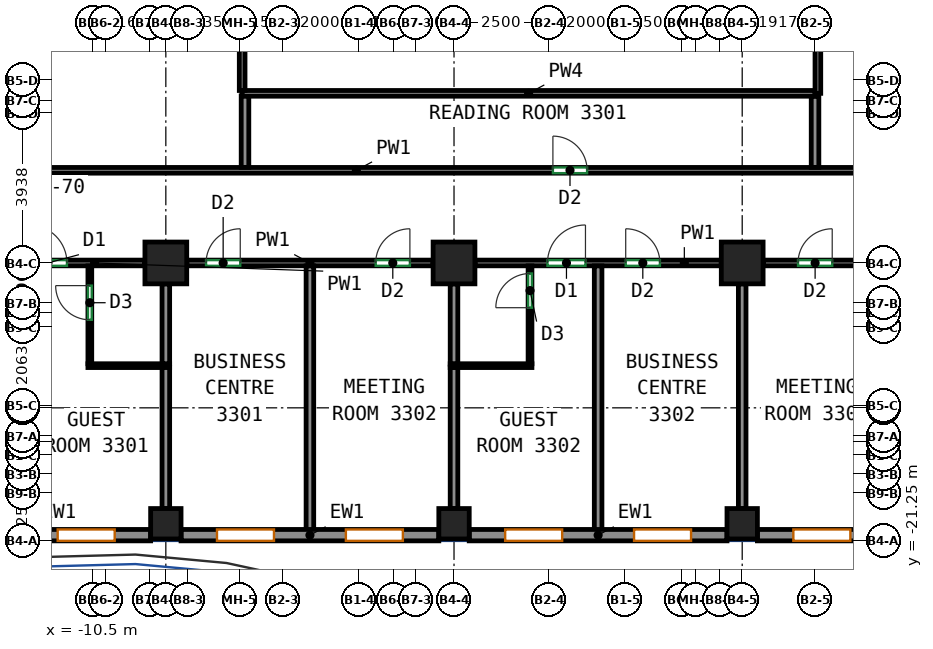
"""IFC4 building model, lengths in metres.
Left out: names, types, materials, properties, quantities, classifications, styles, units other than length and angle.
Written with IfcOpenShell. Run it as: python <this file> out.ifc"""

import sys

from ifc_helpers import new_model, si_unit, direction, frame, frame_2d, origin, origin_2d, place, context, subcontext, project, spatial, rectangle, extrude, source, transform, mapped, element, fill, save


model = new_model("IFC4")
c1 = context("Model", 3, precision=1e-05, world=origin(), true_north=direction((0.0, 1.0)))
c2 = subcontext(c1, "Body", "Model", "MODEL_VIEW")
j1 = project(units=[si_unit("LENGTHUNIT", "METRE"), si_unit("PLANEANGLEUNIT", "RADIAN")], contexts=[c1])
p1 = place(None, origin())
s1 = spatial("IfcSite", under=j1, at=p1, CompositionType="ELEMENT")
p2 = place(p1, origin())
s2 = spatial("IfcBuilding", under=s1, at=p2, CompositionType="ELEMENT")
p3 = place(p2, frame((0.0, 0.0, 147.3)))
s3 = spatial("IfcBuildingStorey", under=s2, at=p3, CompositionType="ELEMENT", Elevation=147.3)
m1 = source(origin(), c2, "Body", "SweptSolid", [
    extrude(rectangle(XDim=0.8, YDim=0.8, at=origin_2d()), origin(), (0.0, 0.0, 1.0), 3.12),
])
p4 = place(p3, frame((-8.583, -20.8, 0.0), z_axis=(0.0, 0.0, 1.0), x_axis=(1.0, 0.0, 0.0)))
e1 = element("IfcColumn", 1, at=p4, inside=s3, PredefinedType="COLUMN", context=c2, shape_type="MappedRepresentation", body=[
    mapped(m1, transform((0.0, 0.0, 0.0))),
])
m2 = source(origin(), c2, "Body", "SweptSolid", [
    extrude(rectangle(XDim=1.1, YDim=1.1, at=origin_2d()), origin(), (0.0, 0.0, 1.0), 3.12),
])
p5 = place(p3, frame((-8.583, -13.938, 0.0), z_axis=(0.0, 0.0, 1.0), x_axis=(1.0, 0.0, 0.0)))
e2 = element("IfcColumn", 2, at=p5, inside=s3, PredefinedType="COLUMN", context=c2, shape_type="MappedRepresentation", body=[
    mapped(m2, transform((0.0, 0.0, 0.0))),
])
p6 = place(p3, frame((-1.0, -20.8, 0.0), z_axis=(0.0, 0.0, 1.0), x_axis=(1.0, 0.0, 0.0)))
e3 = element("IfcColumn", 3, at=p6, inside=s3, PredefinedType="COLUMN", context=c2, shape_type="MappedRepresentation", body=[
    mapped(m1, transform((0.0, 0.0, 0.0))),
])
p7 = place(p3, frame((-1.0, -13.938, 0.0), z_axis=(0.0, 0.0, 1.0), x_axis=(1.0, 0.0, 0.0)))
e4 = element("IfcColumn", 4, at=p7, inside=s3, PredefinedType="COLUMN", context=c2, shape_type="MappedRepresentation", body=[
    mapped(m2, transform((0.0, 0.0, 0.0))),
])
p8 = place(p3, frame((6.583, -20.8, 0.0), z_axis=(0.0, 0.0, 1.0), x_axis=(1.0, 0.0, 0.0)))
e5 = element("IfcColumn", 5, at=p8, inside=s3, PredefinedType="COLUMN", context=c2, shape_type="MappedRepresentation", body=[
    mapped(m1, transform((0.0, 0.0, 0.0))),
])
p9 = place(p3, frame((6.583, -13.938, 0.0), z_axis=(0.0, 0.0, 1.0), x_axis=(1.0, 0.0, 0.0)))
e6 = element("IfcColumn", 6, at=p9, inside=s3, PredefinedType="COLUMN", context=c2, shape_type="MappedRepresentation", body=[
    mapped(m2, transform((0.0, 0.0, 0.0))),
])
m3 = source(origin(), c2, "Body", "SweptSolid", [
    extrude(rectangle(XDim=6.783, YDim=0.3, at=frame_2d((3.392, 0.0))), origin(), (0.0, 0.0, 1.0), 3.12),
])
p10 = place(p3, frame((-15.767, -21.1, 0.0), z_axis=(0.0, 0.0, 1.0), x_axis=(1.0, 0.0, 0.0)))
e7 = element("IfcWall", 7, at=p10, inside=s3, PredefinedType="SOLIDWALL", context=c2, shape_type="MappedRepresentation", body=[
    mapped(m3, transform((0.0, 0.0, 0.0))),
])
p11 = place(p10, frame((0.946, 0.0, 0.85)))
e8 = element("IfcOpeningElement", 8, at=p11, cuts=e7, PredefinedType="OPENING", context=c2, shape_type="SweptSolid", body=[
    extrude(rectangle(XDim=1.5, YDim=1.95, at=frame_2d((0.75, 0.975))), frame((0.0, 0.16, 0.0), z_axis=(0.0, -1.0, 0.0), x_axis=(1.0, 0.0, 0.0)), (0.0, 0.0, 1.0), 0.32),
])
p12 = place(p10, frame((4.338, 0.0, 0.85)))
e9 = element("IfcOpeningElement", 9, at=p12, cuts=e7, PredefinedType="OPENING", context=c2, shape_type="SweptSolid", body=[
    extrude(rectangle(XDim=1.5, YDim=1.95, at=frame_2d((0.75, 0.975))), frame((0.0, 0.16, 0.0), z_axis=(0.0, -1.0, 0.0), x_axis=(1.0, 0.0, 0.0)), (0.0, 0.0, 1.0), 0.32),
])
m4 = source(origin(), c2, "Body", "SweptSolid", [
    extrude(rectangle(XDim=6.783, YDim=0.3, at=frame_2d((3.392, 0.0))), origin(), (0.0, 0.0, 1.0), 3.12),
])
p13 = place(p3, frame((-8.183, -21.1, 0.0), z_axis=(0.0, 0.0, 1.0), x_axis=(1.0, 0.0, 0.0)))
e10 = element("IfcWall", 10, at=p13, inside=s3, PredefinedType="SOLIDWALL", context=c2, shape_type="MappedRepresentation", body=[
    mapped(m4, transform((0.0, 0.0, 0.0))),
])
p14 = place(p13, frame((0.946, 0.0, 0.85)))
e11 = element("IfcOpeningElement", 11, at=p14, cuts=e10, PredefinedType="OPENING", context=c2, shape_type="SweptSolid", body=[
    extrude(rectangle(XDim=1.5, YDim=1.95, at=frame_2d((0.75, 0.975))), frame((0.0, 0.16, 0.0), z_axis=(0.0, -1.0, 0.0), x_axis=(1.0, 0.0, 0.0)), (0.0, 0.0, 1.0), 0.32),
])
p15 = place(p13, frame((4.337, 0.0, 0.85)))
e12 = element("IfcOpeningElement", 12, at=p15, cuts=e10, PredefinedType="OPENING", context=c2, shape_type="SweptSolid", body=[
    extrude(rectangle(XDim=1.5, YDim=1.95, at=frame_2d((0.75, 0.975))), frame((0.0, 0.16, 0.0), z_axis=(0.0, -1.0, 0.0), x_axis=(1.0, 0.0, 0.0)), (0.0, 0.0, 1.0), 0.32),
])
p16 = place(p3, frame((-0.6, -21.1, 0.0), z_axis=(0.0, 0.0, 1.0), x_axis=(1.0, 0.0, 0.0)))
e13 = element("IfcWall", 13, at=p16, inside=s3, PredefinedType="SOLIDWALL", context=c2, shape_type="MappedRepresentation", body=[
    mapped(m4, transform((0.0, 0.0, 0.0))),
])
p17 = place(p16, frame((0.946, 0.0, 0.85)))
e14 = element("IfcOpeningElement", 14, at=p17, cuts=e13, PredefinedType="OPENING", context=c2, shape_type="SweptSolid", body=[
    extrude(rectangle(XDim=1.5, YDim=1.95, at=frame_2d((0.75, 0.975))), frame((0.0, 0.16, 0.0), z_axis=(0.0, -1.0, 0.0), x_axis=(1.0, 0.0, 0.0)), (0.0, 0.0, 1.0), 0.32),
])
p18 = place(p16, frame((4.337, 0.0, 0.85)))
e15 = element("IfcOpeningElement", 15, at=p18, cuts=e13, PredefinedType="OPENING", context=c2, shape_type="SweptSolid", body=[
    extrude(rectangle(XDim=1.5, YDim=1.95, at=frame_2d((0.75, 0.975))), frame((0.0, 0.16, 0.0), z_axis=(0.0, -1.0, 0.0), x_axis=(1.0, 0.0, 0.0)), (0.0, 0.0, 1.0), 0.32),
])
p19 = place(p3, frame((6.983, -21.1, 0.0), z_axis=(0.0, 0.0, 1.0), x_axis=(1.0, 0.0, 0.0)))
e16 = element("IfcWall", 16, at=p19, inside=s3, PredefinedType="SOLIDWALL", context=c2, shape_type="MappedRepresentation", body=[
    mapped(m3, transform((0.0, 0.0, 0.0))),
])
p20 = place(p19, frame((0.946, 0.0, 0.85)))
e17 = element("IfcOpeningElement", 17, at=p20, cuts=e16, PredefinedType="OPENING", context=c2, shape_type="SweptSolid", body=[
    extrude(rectangle(XDim=1.5, YDim=1.95, at=frame_2d((0.75, 0.975))), frame((0.0, 0.16, 0.0), z_axis=(0.0, -1.0, 0.0), x_axis=(1.0, 0.0, 0.0)), (0.0, 0.0, 1.0), 0.32),
])
p21 = place(p19, frame((4.338, 0.0, 0.85)))
e18 = element("IfcOpeningElement", 18, at=p21, cuts=e16, PredefinedType="OPENING", context=c2, shape_type="SweptSolid", body=[
    extrude(rectangle(XDim=1.5, YDim=1.95, at=frame_2d((0.75, 0.975))), frame((0.0, 0.16, 0.0), z_axis=(0.0, -1.0, 0.0), x_axis=(1.0, 0.0, 0.0)), (0.0, 0.0, 1.0), 0.32),
])
p22 = place(p3, frame((-13.55, -13.938, 0.0), z_axis=(0.0, 0.0, 1.0), x_axis=(1.0, 0.0, 0.0)))
e19 = element("IfcWall", 19, at=p22, inside=s3, PredefinedType="PARTITIONING", context=c2, shape_type="SweptSolid", body=[
    extrude(rectangle(XDim=4.417, YDim=0.15, at=frame_2d((2.208, 0.0))), origin(), (0.0, 0.0, 1.0), 3.12),
])
p23 = place(p22, frame((1.365, 0.0, 0.0)))
e20 = element("IfcOpeningElement", 20, at=p23, cuts=e19, PredefinedType="OPENING", context=c2, shape_type="SweptSolid", body=[
    extrude(rectangle(XDim=1.0, YDim=2.1, at=frame_2d((0.5, 1.05))), frame((0.0, 0.085, 0.0), z_axis=(0.0, -1.0, 0.0), x_axis=(1.0, 0.0, 0.0)), (0.0, 0.0, 1.0), 0.17),
])
p24 = place(p3, frame((-8.033, -13.938, 0.0), z_axis=(0.0, 0.0, 1.0), x_axis=(1.0, 0.0, 0.0)))
e21 = element("IfcWall", 21, at=p24, inside=s3, PredefinedType="PARTITIONING", context=c2, shape_type="SweptSolid", body=[
    extrude(rectangle(XDim=6.483, YDim=0.15, at=frame_2d((3.241, 0.0))), origin(), (0.0, 0.0, 1.0), 3.12),
])
p25 = place(p24, frame((0.508, 0.0, 0.0)))
e22 = element("IfcOpeningElement", 22, at=p25, cuts=e21, PredefinedType="OPENING", context=c2, shape_type="SweptSolid", body=[
    extrude(rectangle(XDim=0.9, YDim=2.1, at=frame_2d((0.45, 1.05))), frame((0.0, 0.085, 0.0), z_axis=(0.0, -1.0, 0.0), x_axis=(1.0, 0.0, 0.0)), (0.0, 0.0, 1.0), 0.17),
])
p26 = place(p24, frame((4.972, 0.0, 0.0)))
e23 = element("IfcOpeningElement", 23, at=p26, cuts=e21, PredefinedType="OPENING", context=c2, shape_type="SweptSolid", body=[
    extrude(rectangle(XDim=0.9, YDim=2.1, at=frame_2d((0.45, 1.05))), frame((0.0, 0.085, 0.0), z_axis=(0.0, -1.0, 0.0), x_axis=(1.0, 0.0, 0.0)), (0.0, 0.0, 1.0), 0.17),
])
p27 = place(p3, frame((-0.45, -13.938, 0.0), z_axis=(0.0, 0.0, 1.0), x_axis=(1.0, 0.0, 0.0)))
e24 = element("IfcWall", 24, at=p27, inside=s3, PredefinedType="PARTITIONING", context=c2, shape_type="SweptSolid", body=[
    extrude(rectangle(XDim=6.483, YDim=0.15, at=frame_2d((3.241, 0.0))), origin(), (0.0, 0.0, 1.0), 3.12),
])
p28 = place(p27, frame((1.909, 0.0, 0.0)))
e25 = element("IfcOpeningElement", 25, at=p28, cuts=e24, PredefinedType="OPENING", context=c2, shape_type="SweptSolid", body=[
    extrude(rectangle(XDim=1.0, YDim=2.1, at=frame_2d((0.5, 1.05))), frame((0.0, 0.085, 0.0), z_axis=(0.0, -1.0, 0.0), x_axis=(1.0, 0.0, 0.0)), (0.0, 0.0, 1.0), 0.17),
])
p29 = place(p27, frame((3.968, 0.0, 0.0)))
e26 = element("IfcOpeningElement", 26, at=p29, cuts=e24, PredefinedType="OPENING", context=c2, shape_type="SweptSolid", body=[
    extrude(rectangle(XDim=0.9, YDim=2.1, at=frame_2d((0.45, 1.05))), frame((0.0, 0.085, 0.0), z_axis=(0.0, -1.0, 0.0), x_axis=(1.0, 0.0, 0.0)), (0.0, 0.0, 1.0), 0.17),
])
p30 = place(p3, frame((7.133, -13.938, 0.0), z_axis=(0.0, 0.0, 1.0), x_axis=(1.0, 0.0, 0.0)))
e27 = element("IfcWall", 27, at=p30, inside=s3, PredefinedType="PARTITIONING", context=c2, shape_type="SweptSolid", body=[
    extrude(rectangle(XDim=6.484, YDim=0.15, at=frame_2d((3.242, 0.0))), origin(), (0.0, 0.0, 1.0), 3.12),
])
p31 = place(p30, frame((0.919, 0.0, 0.0)))
e28 = element("IfcOpeningElement", 28, at=p31, cuts=e27, PredefinedType="OPENING", context=c2, shape_type="SweptSolid", body=[
    extrude(rectangle(XDim=0.9, YDim=2.1, at=frame_2d((0.45, 1.05))), frame((0.0, 0.085, 0.0), z_axis=(0.0, -1.0, 0.0), x_axis=(1.0, 0.0, 0.0)), (0.0, 0.0, 1.0), 0.17),
])
p32 = place(p30, frame((3.432, 0.0, 0.0)))
e29 = element("IfcOpeningElement", 29, at=p32, cuts=e27, PredefinedType="OPENING", context=c2, shape_type="SweptSolid", body=[
    extrude(rectangle(XDim=1.0, YDim=2.1, at=frame_2d((0.5, 1.05))), frame((0.0, 0.085, 0.0), z_axis=(0.0, -1.0, 0.0), x_axis=(1.0, 0.0, 0.0)), (0.0, 0.0, 1.0), 0.17),
])
p33 = place(p3, frame((-12.075, -11.5, 0.0), z_axis=(0.0, 0.0, 1.0), x_axis=(1.0, 0.0, 0.0)))
e30 = element("IfcWall", 30, at=p33, inside=s3, PredefinedType="PARTITIONING", context=c2, shape_type="SweptSolid", body=[
    extrude(rectangle(XDim=28.35, YDim=0.15, at=frame_2d((14.175, 0.0))), origin(), (0.0, 0.0, 1.0), 3.12),
])
p34 = place(p33, frame((13.677, 0.0, 0.0)))
e31 = element("IfcOpeningElement", 31, at=p34, cuts=e30, PredefinedType="OPENING", context=c2, shape_type="SweptSolid", body=[
    extrude(rectangle(XDim=0.9, YDim=2.1, at=frame_2d((0.45, 1.05))), frame((0.0, 0.085, 0.0), z_axis=(0.0, -1.0, 0.0), x_axis=(1.0, 0.0, 0.0)), (0.0, 0.0, 1.0), 0.17),
])
p35 = place(p3, frame((-10.583, -16.59, 0.0), z_axis=(0.0, 0.0, 1.0), x_axis=(0.0, 1.0, 0.0)))
e32 = element("IfcWall", 32, at=p35, inside=s3, PredefinedType="PARTITIONING", context=c2, shape_type="SweptSolid", body=[
    extrude(rectangle(XDim=2.575, YDim=0.1, at=frame_2d((1.288, 0.0))), origin(), (0.0, 0.0, 1.0), 3.12),
])
p36 = place(p35, frame((1.156, 0.0, 0.0)))
e33 = element("IfcOpeningElement", 33, at=p36, cuts=e32, PredefinedType="OPENING", context=c2, shape_type="SweptSolid", body=[
    extrude(rectangle(XDim=0.9, YDim=2.1, at=frame_2d((0.45, 1.05))), frame((0.0, 0.06, 0.0), z_axis=(0.0, -1.0, 0.0), x_axis=(1.0, 0.0, 0.0)), (0.0, 0.0, 1.0), 0.12),
])
p37 = place(p3, frame((-10.633, -16.64, 0.0), z_axis=(0.0, 0.0, 1.0), x_axis=(1.0, 0.0, 0.0)))
e34 = element("IfcWall", 34, at=p37, inside=s3, PredefinedType="PARTITIONING", context=c2, shape_type="SweptSolid", body=[
    extrude(rectangle(XDim=2.15, YDim=0.1, at=frame_2d((1.075, 0.0))), origin(), (0.0, 0.0, 1.0), 3.12),
])
p38 = place(p3, frame((-8.583, -20.4, 0.0), z_axis=(0.0, 0.0, 1.0), x_axis=(0.0, 1.0, 0.0)))
e35 = element("IfcWall", 35, at=p38, inside=s3, PredefinedType="PARTITIONING", context=c2, shape_type="SweptSolid", body=[
    extrude(rectangle(XDim=3.71, YDim=0.2, at=frame_2d((1.855, 0.0))), origin(), (0.0, 0.0, 1.0), 3.12),
])
p39 = place(p3, frame((-8.583, -16.59, 0.0), z_axis=(0.0, 0.0, 1.0), x_axis=(0.0, 1.0, 0.0)))
e36 = element("IfcWall", 36, at=p39, inside=s3, PredefinedType="PARTITIONING", context=c2, shape_type="SweptSolid", body=[
    extrude(rectangle(XDim=2.102, YDim=0.2, at=frame_2d((1.051, 0.0))), origin(), (0.0, 0.0, 1.0), 3.12),
])
p40 = place(p3, frame((-4.792, -21.0, 0.0), z_axis=(0.0, 0.0, 1.0), x_axis=(0.0, 1.0, 0.0)))
e37 = element("IfcWall", 37, at=p40, inside=s3, PredefinedType="PARTITIONING", context=c2, shape_type="SweptSolid", body=[
    extrude(rectangle(XDim=6.985, YDim=0.2, at=frame_2d((3.493, 0.0))), origin(), (0.0, 0.0, 1.0), 3.12),
])
p41 = place(p3, frame((-1.0, -20.4, 0.0), z_axis=(0.0, 0.0, 1.0), x_axis=(0.0, 1.0, 0.0)))
e38 = element("IfcWall", 38, at=p41, inside=s3, PredefinedType="PARTITIONING", context=c2, shape_type="SweptSolid", body=[
    extrude(rectangle(XDim=3.72, YDim=0.2, at=frame_2d((1.86, 0.0))), origin(), (0.0, 0.0, 1.0), 3.12),
])
p42 = place(p3, frame((-1.0, -16.6, 0.0), z_axis=(0.0, 0.0, 1.0), x_axis=(0.0, 1.0, 0.0)))
e39 = element("IfcWall", 39, at=p42, inside=s3, PredefinedType="PARTITIONING", context=c2, shape_type="SweptSolid", body=[
    extrude(rectangle(XDim=2.112, YDim=0.2, at=frame_2d((1.056, 0.0))), origin(), (0.0, 0.0, 1.0), 3.12),
])
p43 = place(p3, frame((1.0, -16.59, 0.0), z_axis=(0.0, 0.0, 1.0), x_axis=(0.0, 1.0, 0.0)))
e40 = element("IfcWall", 40, at=p43, inside=s3, PredefinedType="PARTITIONING", context=c2, shape_type="SweptSolid", body=[
    extrude(rectangle(XDim=2.575, YDim=0.1, at=frame_2d((1.288, 0.0))), origin(), (0.0, 0.0, 1.0), 3.12),
])
p44 = place(p43, frame((1.475, 0.0, 0.0)))
e41 = element("IfcOpeningElement", 41, at=p44, cuts=e40, PredefinedType="OPENING", context=c2, shape_type="SweptSolid", body=[
    extrude(rectangle(XDim=0.9, YDim=2.1, at=frame_2d((0.45, 1.05))), frame((0.0, 0.06, 0.0), z_axis=(0.0, -1.0, 0.0), x_axis=(1.0, 0.0, 0.0)), (0.0, 0.0, 1.0), 0.12),
])
p45 = place(p3, frame((-1.1, -16.64, 0.0), z_axis=(0.0, 0.0, 1.0), x_axis=(1.0, 0.0, 0.0)))
e42 = element("IfcWall", 42, at=p45, inside=s3, PredefinedType="PARTITIONING", context=c2, shape_type="SweptSolid", body=[
    extrude(rectangle(XDim=2.15, YDim=0.1, at=frame_2d((1.075, 0.0))), origin(), (0.0, 0.0, 1.0), 3.12),
])
p46 = place(p3, frame((2.792, -21.0, 0.0), z_axis=(0.0, 0.0, 1.0), x_axis=(0.0, 1.0, 0.0)))
e43 = element("IfcWall", 43, at=p46, inside=s3, PredefinedType="PARTITIONING", context=c2, shape_type="SweptSolid", body=[
    extrude(rectangle(XDim=6.985, YDim=0.2, at=frame_2d((3.493, 0.0))), origin(), (0.0, 0.0, 1.0), 3.12),
])
p47 = place(p3, frame((6.583, -20.4, 0.0), z_axis=(0.0, 0.0, 1.0), x_axis=(0.0, 1.0, 0.0)))
e44 = element("IfcWall", 44, at=p47, inside=s3, PredefinedType="PARTITIONING", context=c2, shape_type="SweptSolid", body=[
    extrude(rectangle(XDim=5.912, YDim=0.2, at=frame_2d((2.956, 0.0))), origin(), (0.0, 0.0, 1.0), 3.12),
])
p48 = place(p3, frame((-6.5, -11.423, 0.0), z_axis=(0.0, 0.0, 1.0), x_axis=(0.0, 1.0, 0.0)))
e45 = element("IfcWall", 45, at=p48, inside=s3, PredefinedType="PARTITIONING", context=c2, shape_type="SweptSolid", body=[
    extrude(rectangle(XDim=1.883, YDim=0.2, at=frame_2d((0.941, 0.0))), origin(), (0.0, 0.0, 1.0), 3.12),
])
p49 = place(p3, frame((8.5, -11.423, 0.0), z_axis=(0.0, 0.0, 1.0), x_axis=(0.0, 1.0, 0.0)))
e46 = element("IfcWall", 46, at=p49, inside=s3, PredefinedType="PARTITIONING", context=c2, shape_type="SweptSolid", body=[
    extrude(rectangle(XDim=1.873, YDim=0.2, at=frame_2d((0.937, 0.0))), origin(), (0.0, 0.0, 1.0), 3.12),
])
p50 = place(p3, frame((8.5, -9.475, 0.0), z_axis=(0.0, 0.0, 1.0), x_axis=(-1.0, 0.0, 0.0)))
e47 = element("IfcWall", 47, at=p50, inside=s3, PredefinedType="PARTITIONING", context=c2, shape_type="SweptSolid", body=[
    extrude(rectangle(XDim=15.075, YDim=0.15, at=frame_2d((7.538, 0.0))), origin(), (0.0, 0.0, 1.0), 3.12),
])
p51 = place(p3, frame((-6.575, -9.4, 0.0), z_axis=(0.0, 0.0, 1.0), x_axis=(0.0, 1.0, 0.0)))
e48 = element("IfcWall", 48, at=p51, inside=s3, PredefinedType="PARTITIONING", context=c2, shape_type="SweptSolid", body=[
    extrude(rectangle(XDim=15.0, YDim=0.15, at=frame_2d((7.5, 0.0))), origin(), (0.0, 0.0, 1.0), 3.12),
])
p52 = place(p3, frame((8.575, 5.675, 0.0), z_axis=(0.0, 0.0, 1.0), x_axis=(0.0, -1.0, 0.0)))
e49 = element("IfcWall", 49, at=p52, inside=s3, PredefinedType="PARTITIONING", context=c2, shape_type="SweptSolid", body=[
    extrude(rectangle(XDim=15.15, YDim=0.15, at=frame_2d((7.575, 0.0))), origin(), (0.0, 0.0, 1.0), 3.12),
])
p53 = place(p12, origin())
e50 = element("IfcWindow", 50, at=p53, inside=s3, PartitioningType="SINGLE_PANEL", PredefinedType="WINDOW", context=c2, shape_type="SweptSolid", body=[
    extrude(rectangle(XDim=1.5, YDim=1.95, at=frame_2d((0.75, 0.975))), frame((0.0, 0.03, 0.0), z_axis=(0.0, -1.0, 0.0), x_axis=(1.0, 0.0, 0.0)), (0.0, 0.0, 1.0), 0.06),
])
fill(e9, e50)
p54 = place(p14, origin())
e51 = element("IfcWindow", 51, at=p54, inside=s3, PartitioningType="SINGLE_PANEL", PredefinedType="WINDOW", context=c2, shape_type="SweptSolid", body=[
    extrude(rectangle(XDim=1.5, YDim=1.95, at=frame_2d((0.75, 0.975))), frame((0.0, 0.03, 0.0), z_axis=(0.0, -1.0, 0.0), x_axis=(1.0, 0.0, 0.0)), (0.0, 0.0, 1.0), 0.06),
])
fill(e11, e51)
p55 = place(p15, origin())
e52 = element("IfcWindow", 52, at=p55, inside=s3, PartitioningType="SINGLE_PANEL", PredefinedType="WINDOW", context=c2, shape_type="SweptSolid", body=[
    extrude(rectangle(XDim=1.5, YDim=1.95, at=frame_2d((0.75, 0.975))), frame((0.0, 0.03, 0.0), z_axis=(0.0, -1.0, 0.0), x_axis=(1.0, 0.0, 0.0)), (0.0, 0.0, 1.0), 0.06),
])
fill(e12, e52)
p56 = place(p17, origin())
e53 = element("IfcWindow", 53, at=p56, inside=s3, PartitioningType="SINGLE_PANEL", PredefinedType="WINDOW", context=c2, shape_type="SweptSolid", body=[
    extrude(rectangle(XDim=1.5, YDim=1.95, at=frame_2d((0.75, 0.975))), frame((0.0, 0.03, 0.0), z_axis=(0.0, -1.0, 0.0), x_axis=(1.0, 0.0, 0.0)), (0.0, 0.0, 1.0), 0.06),
])
fill(e14, e53)
p57 = place(p18, origin())
e54 = element("IfcWindow", 54, at=p57, inside=s3, PartitioningType="SINGLE_PANEL", PredefinedType="WINDOW", context=c2, shape_type="SweptSolid", body=[
    extrude(rectangle(XDim=1.5, YDim=1.95, at=frame_2d((0.75, 0.975))), frame((0.0, 0.03, 0.0), z_axis=(0.0, -1.0, 0.0), x_axis=(1.0, 0.0, 0.0)), (0.0, 0.0, 1.0), 0.06),
])
fill(e15, e54)
p58 = place(p20, origin())
e55 = element("IfcWindow", 55, at=p58, inside=s3, PartitioningType="SINGLE_PANEL", PredefinedType="WINDOW", context=c2, shape_type="SweptSolid", body=[
    extrude(rectangle(XDim=1.5, YDim=1.95, at=frame_2d((0.75, 0.975))), frame((0.0, 0.03, 0.0), z_axis=(0.0, -1.0, 0.0), x_axis=(1.0, 0.0, 0.0)), (0.0, 0.0, 1.0), 0.06),
])
fill(e17, e55)
p59 = place(p36, origin())
e56 = element("IfcDoor", 56, at=p59, inside=s3, OperationType="SINGLE_SWING_RIGHT", PredefinedType="DOOR", context=c2, shape_type="SweptSolid", body=[
    extrude(rectangle(XDim=0.9, YDim=2.1, at=frame_2d((0.45, 1.05))), frame((0.0, 0.025, 0.0), z_axis=(0.0, -1.0, 0.0), x_axis=(1.0, 0.0, 0.0)), (0.0, 0.0, 1.0), 0.05),
])
fill(e33, e56)
p60 = place(p44, origin())
e57 = element("IfcDoor", 57, at=p60, inside=s3, OperationType="SINGLE_SWING_LEFT", PredefinedType="DOOR", context=c2, shape_type="SweptSolid", body=[
    extrude(rectangle(XDim=0.9, YDim=2.1, at=frame_2d((0.45, 1.05))), frame((0.0, 0.025, 0.0), z_axis=(0.0, -1.0, 0.0), x_axis=(1.0, 0.0, 0.0)), (0.0, 0.0, 1.0), 0.05),
])
fill(e41, e57)
p61 = place(p23, origin())
e58 = element("IfcDoor", 58, at=p61, inside=s3, OperationType="SINGLE_SWING_LEFT", PredefinedType="DOOR", context=c2, shape_type="SweptSolid", body=[
    extrude(rectangle(XDim=1.0, YDim=2.1, at=frame_2d((0.5, 1.05))), frame((0.0, 0.025, 0.0), z_axis=(0.0, -1.0, 0.0), x_axis=(1.0, 0.0, 0.0)), (0.0, 0.0, 1.0), 0.05),
])
fill(e20, e58)
p62 = place(p25, origin())
e59 = element("IfcDoor", 59, at=p62, inside=s3, OperationType="SINGLE_SWING_RIGHT", PredefinedType="DOOR", context=c2, shape_type="SweptSolid", body=[
    extrude(rectangle(XDim=0.9, YDim=2.1, at=frame_2d((0.45, 1.05))), frame((0.0, 0.025, 0.0), z_axis=(0.0, -1.0, 0.0), x_axis=(1.0, 0.0, 0.0)), (0.0, 0.0, 1.0), 0.05),
])
fill(e22, e59)
p63 = place(p26, origin())
e60 = element("IfcDoor", 60, at=p63, inside=s3, OperationType="SINGLE_SWING_RIGHT", PredefinedType="DOOR", context=c2, shape_type="SweptSolid", body=[
    extrude(rectangle(XDim=0.9, YDim=2.1, at=frame_2d((0.45, 1.05))), frame((0.0, 0.025, 0.0), z_axis=(0.0, -1.0, 0.0), x_axis=(1.0, 0.0, 0.0)), (0.0, 0.0, 1.0), 0.05),
])
fill(e23, e60)
p64 = place(p28, origin())
e61 = element("IfcDoor", 61, at=p64, inside=s3, OperationType="SINGLE_SWING_RIGHT", PredefinedType="DOOR", context=c2, shape_type="SweptSolid", body=[
    extrude(rectangle(XDim=1.0, YDim=2.1, at=frame_2d((0.5, 1.05))), frame((0.0, 0.025, 0.0), z_axis=(0.0, -1.0, 0.0), x_axis=(1.0, 0.0, 0.0)), (0.0, 0.0, 1.0), 0.05),
])
fill(e25, e61)
p65 = place(p29, origin())
e62 = element("IfcDoor", 62, at=p65, inside=s3, OperationType="SINGLE_SWING_LEFT", PredefinedType="DOOR", context=c2, shape_type="SweptSolid", body=[
    extrude(rectangle(XDim=0.9, YDim=2.1, at=frame_2d((0.45, 1.05))), frame((0.0, 0.025, 0.0), z_axis=(0.0, -1.0, 0.0), x_axis=(1.0, 0.0, 0.0)), (0.0, 0.0, 1.0), 0.05),
])
fill(e26, e62)
p66 = place(p31, origin())
e63 = element("IfcDoor", 63, at=p66, inside=s3, OperationType="SINGLE_SWING_RIGHT", PredefinedType="DOOR", context=c2, shape_type="SweptSolid", body=[
    extrude(rectangle(XDim=0.9, YDim=2.1, at=frame_2d((0.45, 1.05))), frame((0.0, 0.025, 0.0), z_axis=(0.0, -1.0, 0.0), x_axis=(1.0, 0.0, 0.0)), (0.0, 0.0, 1.0), 0.05),
])
fill(e28, e63)
p67 = place(p34, origin())
e64 = element("IfcDoor", 64, at=p67, inside=s3, OperationType="SINGLE_SWING_LEFT", PredefinedType="DOOR", context=c2, shape_type="SweptSolid", body=[
    extrude(rectangle(XDim=0.9, YDim=2.1, at=frame_2d((0.45, 1.05))), frame((0.0, 0.025, 0.0), z_axis=(0.0, -1.0, 0.0), x_axis=(1.0, 0.0, 0.0)), (0.0, 0.0, 1.0), 0.05),
])
fill(e31, e64)
save(model, sys.argv[1])
